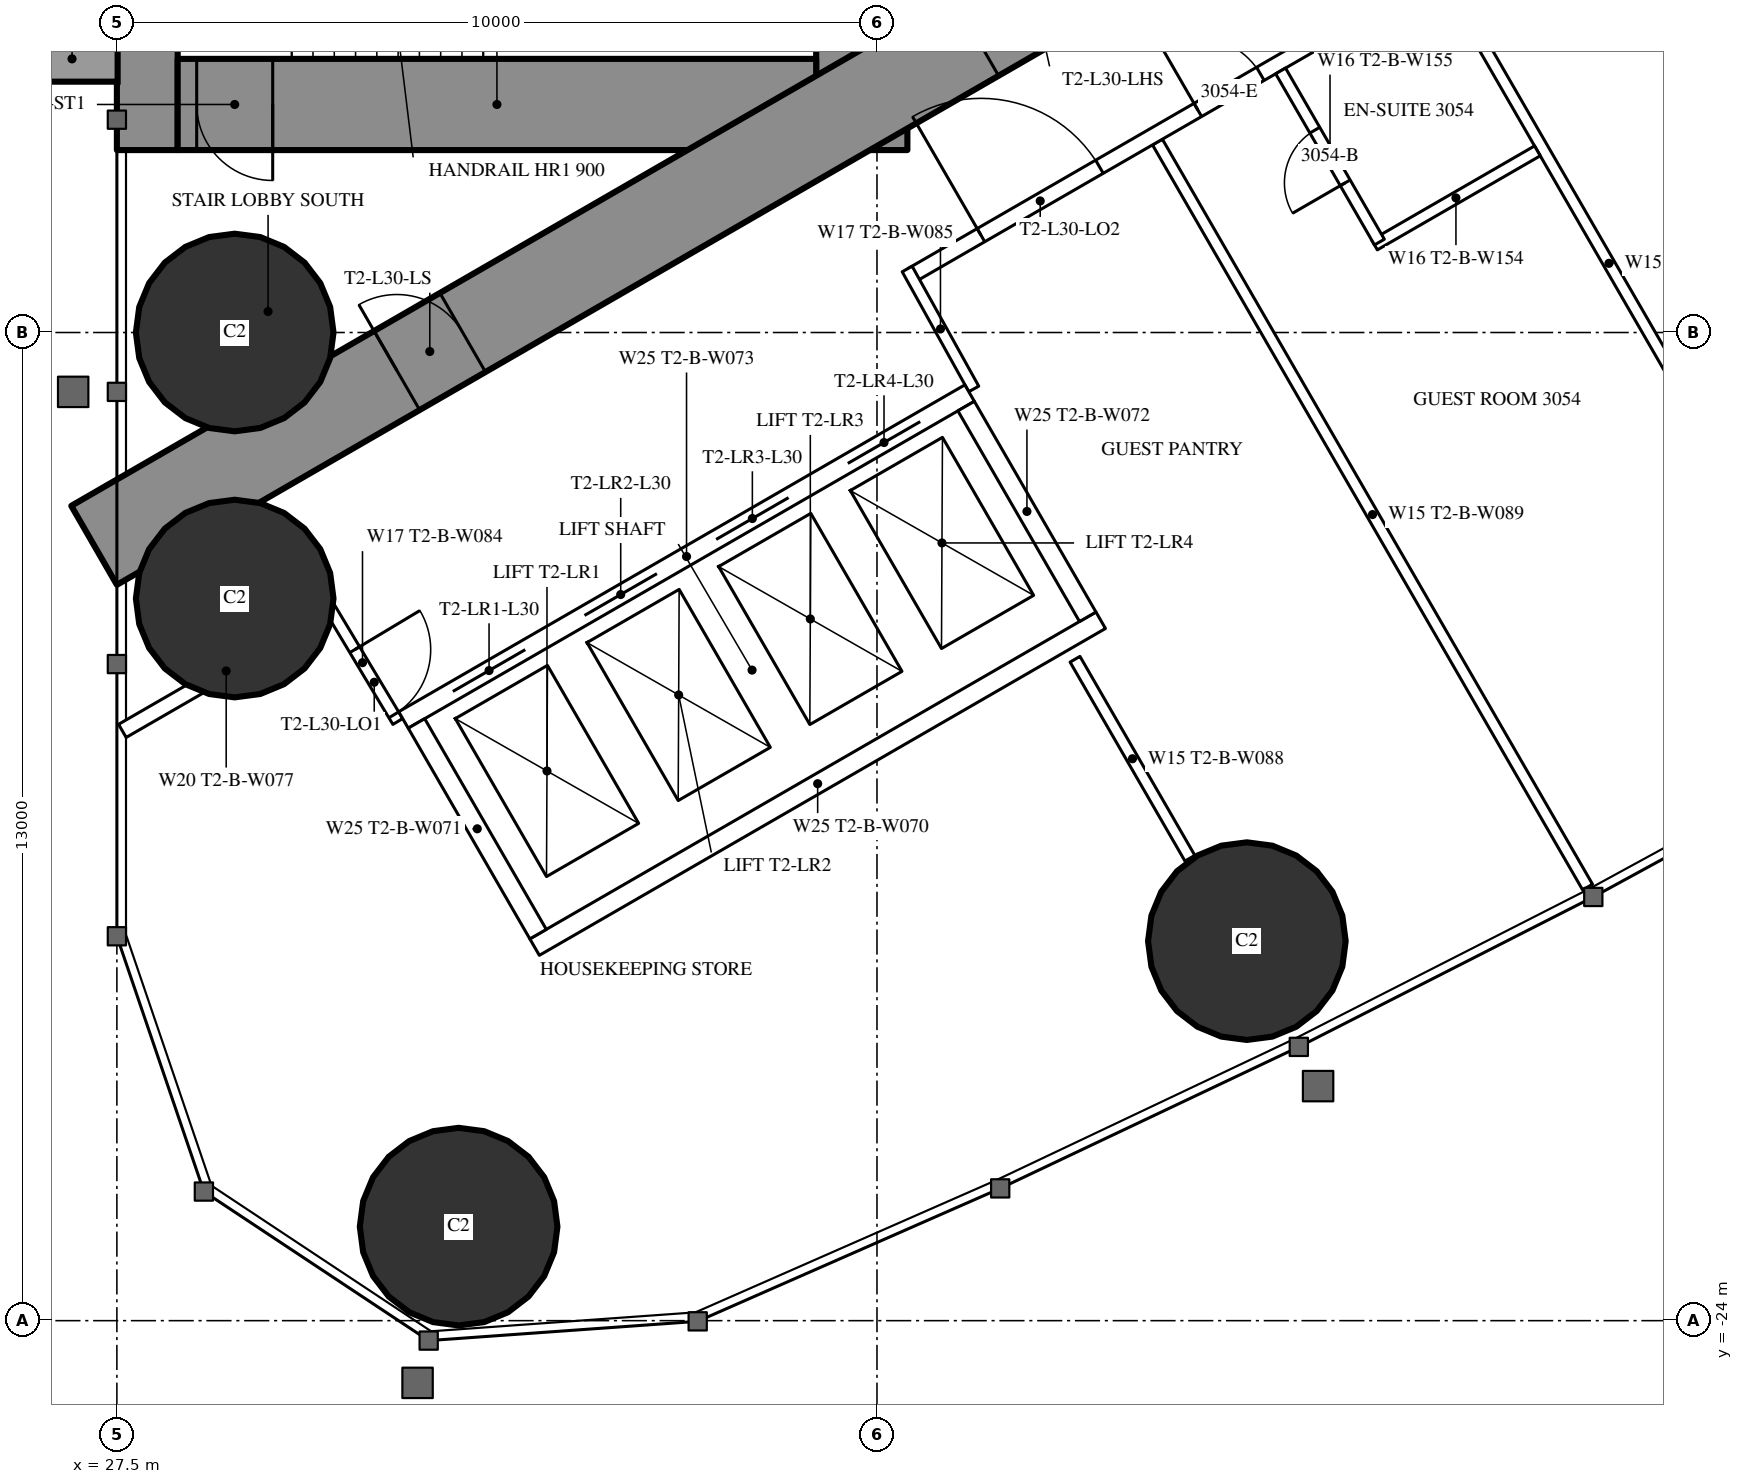
"""IFC4 building model, lengths in metres.
Left out: names, types, materials, properties, quantities, classifications, styles, units other than length and angle.
Written with IfcOpenShell. Run it as: python <this file> out.ifc"""

import sys

from ifc_helpers import new_model, si_unit, direction, frame, frame_2d, origin, origin_2d, place, context, subcontext, project, spatial, rectangle, hollow_circle, extrude, element, fill, save


model = new_model("IFC4")
c1 = context("Model", 3, precision=1e-05, world=origin(), true_north=direction((0.0, 1.0)))
c2 = subcontext(c1, "Body", "Model", "MODEL_VIEW")
j1 = project(units=[si_unit("LENGTHUNIT", "METRE"), si_unit("PLANEANGLEUNIT", "RADIAN")], contexts=[c1])
p1 = place(None, origin())
s1 = spatial("IfcSite", under=j1, at=p1, CompositionType="ELEMENT")
p2 = place(p1, origin())
s2 = spatial("IfcBuilding", under=s1, at=p2, CompositionType="ELEMENT")
p3 = place(p2, frame((0.0, 0.0, 115.1)))
s3 = spatial("IfcBuildingStorey", under=s2, at=p3, CompositionType="ELEMENT", Elevation=115.1)
for number, where, z_axis, x_axis in (
    (1, (31.996, -22.763, 0.0), (0.0, 0.0, 1.0), (1.0, 0.0, 0.0)),
    (2, (29.05, -11.0, 0.0), (0.0, 0.0, 1.0), (1.0, 0.0, 0.0)),
    (3, (29.05, -14.5, 0.0), (0.0, 0.0, 1.0), (1.0, 0.0, 0.0)),
    (4, (42.366, -19.007, 0.0), (0.0, 0.0, 1.0), (1.0, 0.0, 0.0)),
):
    element("IfcColumn", number, at=place(p3, frame(where, z_axis=z_axis, x_axis=x_axis)), inside=s3, PredefinedType="COLUMN", context=c2, shape_type="SweptSolid", body=[
        extrude(hollow_circle(Radius=1.3, WallThickness=0.1, at=origin_2d()), origin(), (0.0, 0.0, 1.0), 3.5),
    ])
p4 = place(p3, frame((27.9, -8.6, 0.0), z_axis=(0.0, 0.0, 1.0), x_axis=(0.0, 1.0, 0.0)))
e5 = element("IfcWall", 5, at=p4, inside=s3, PredefinedType="SHEAR", context=c2, shape_type="SweptSolid", body=[
    extrude(rectangle(XDim=17.2, YDim=0.8, at=frame_2d((8.6, 0.0))), origin(), (0.0, 0.0, 1.0), 3.5),
])
p5 = place(p4, frame((2.45, 0.0, 0.6)))
e6 = element("IfcOpeningElement", 6, at=p5, cuts=e5, PredefinedType="OPENING", context=c2, shape_type="SweptSolid", body=[
    extrude(rectangle(XDim=0.6, YDim=2.1, at=frame_2d((0.3, 1.05))), frame((0.0, 0.41, 0.0), z_axis=(0.0, -1.0, 0.0), x_axis=(1.0, 0.0, 0.0)), (0.0, 0.0, 1.0), 0.82),
])
p6 = place(p4, frame((14.15, 0.0, 0.6)))
e7 = element("IfcOpeningElement", 7, at=p6, cuts=e5, PredefinedType="OPENING", context=c2, shape_type="SweptSolid", body=[
    extrude(rectangle(XDim=0.6, YDim=2.1, at=frame_2d((0.3, 1.05))), frame((0.0, 0.41, 0.0), z_axis=(0.0, -1.0, 0.0), x_axis=(1.0, 0.0, 0.0)), (0.0, 0.0, 1.0), 0.82),
])
p7 = place(p3, frame((37.3, -8.6, 0.0), z_axis=(0.0, 0.0, 1.0), x_axis=(0.0, 1.0, 0.0)))
e8 = element("IfcWall", 8, at=p7, inside=s3, PredefinedType="SHEAR", context=c2, shape_type="SweptSolid", body=[
    extrude(rectangle(XDim=17.2, YDim=1.2, at=frame_2d((8.6, 0.0))), origin(), (0.0, 0.0, 1.0), 3.5),
])
p8 = place(p7, frame((7.7, 0.0, 0.0)))
e9 = element("IfcOpeningElement", 9, at=p8, cuts=e8, PredefinedType="OPENING", context=c2, shape_type="SweptSolid", body=[
    extrude(rectangle(XDim=1.8, YDim=2.2, at=frame_2d((0.9, 1.1))), frame((0.0, 0.61, 0.0), z_axis=(0.0, -1.0, 0.0), x_axis=(1.0, 0.0, 0.0)), (0.0, 0.0, 1.0), 1.22),
])
p9 = place(p3, frame((28.3, -8.0, 0.0), z_axis=(0.0, 0.0, 1.0), x_axis=(1.0, 0.0, 0.0)))
e10 = element("IfcWall", 10, at=p9, inside=s3, PredefinedType="SHEAR", context=c2, shape_type="SweptSolid", body=[
    extrude(rectangle(XDim=8.4, YDim=1.2, at=frame_2d((4.2, 0.0))), origin(), (0.0, 0.0, 1.0), 3.5),
])
p10 = place(p9, frame((0.25, 0.0, 0.0)))
e11 = element("IfcOpeningElement", 11, at=p10, cuts=e10, PredefinedType="OPENING", context=c2, shape_type="SweptSolid", body=[
    extrude(rectangle(XDim=1.0, YDim=2.2, at=frame_2d((0.5, 1.1))), frame((0.0, 0.61, 0.0), z_axis=(0.0, -1.0, 0.0), x_axis=(1.0, 0.0, 0.0)), (0.0, 0.0, 1.0), 1.22),
])
p11 = place(p3, frame((27.2, -13.8, 0.0), z_axis=(0.0, 0.0, 1.0), x_axis=(0.866027159892, 0.499996958321, 0.0)))
e12 = element("IfcWall", 12, at=p11, inside=s3, PredefinedType="SHEAR", context=c2, shape_type="SweptSolid", body=[
    extrude(rectangle(XDim=27.947, YDim=1.2, at=frame_2d((13.973, 0.0))), origin(), (0.0, 0.0, 1.0), 3.5),
])
p12 = place(p11, frame((4.6, 0.0, 0.0)))
e13 = element("IfcOpeningElement", 13, at=p12, cuts=e12, PredefinedType="OPENING", context=c2, shape_type="SweptSolid", body=[
    extrude(rectangle(XDim=1.0, YDim=2.2, at=frame_2d((0.5, 1.1))), frame((0.0, 0.61, 0.0), z_axis=(0.0, -1.0, 0.0), x_axis=(1.0, 0.0, 0.0)), (0.0, 0.0, 1.0), 1.22),
])
p13 = place(p11, frame((13.395, 0.0, 0.0)))
e14 = element("IfcOpeningElement", 14, at=p13, cuts=e12, PredefinedType="OPENING", context=c2, shape_type="SweptSolid", body=[
    extrude(rectangle(XDim=1.8, YDim=2.2, at=frame_2d((0.9, 1.1))), frame((0.0, 0.61, 0.0), z_axis=(0.0, -1.0, 0.0), x_axis=(1.0, 0.0, 0.0)), (0.0, 0.0, 1.0), 1.22),
])
p14 = place(p3, frame((41.19, -8.494, 0.0), z_axis=(0.0, 0.0, 1.0), x_axis=(0.49999258054, -0.866029687369, 0.0)))
e15 = element("IfcWall", 15, at=p14, inside=s3, PredefinedType="PARTITIONING", context=c2, shape_type="SweptSolid", body=[
    extrude(rectangle(XDim=11.318, YDim=0.15, at=frame_2d((5.659, 0.0))), origin(), (0.0, 0.0, 1.0), 3.25),
])
p15 = place(p3, frame((44.954, -6.321, 0.0), z_axis=(0.0, 0.0, 1.0), x_axis=(0.500018676722, -0.866014620505, 0.0)))
e16 = element("IfcWall", 16, at=p15, inside=s3, PredefinedType="PARTITIONING", context=c2, shape_type="SweptSolid", body=[
    extrude(rectangle(XDim=8.704, YDim=0.15, at=frame_2d((4.352, 0.0))), origin(), (0.0, 0.0, 1.0), 2.2),
])
p16 = place(p3, frame((40.105, -15.299, 0.0), z_axis=(0.0, 0.0, 1.0), x_axis=(0.499978822259, -0.866037630414, 0.0)))
e17 = element("IfcWall", 17, at=p16, inside=s3, PredefinedType="PARTITIONING", context=c2, shape_type="SweptSolid", body=[
    extrude(rectangle(XDim=3.023, YDim=0.15, at=frame_2d((1.511, 0.0))), origin(), (0.0, 0.0, 1.0), 3.25),
])
p17 = place(p3, frame((27.572, -16.241, 0.0), z_axis=(0.0, 0.0, 1.0), x_axis=(0.866029654818, 0.499992636921, 0.0)))
e18 = element("IfcWall", 18, at=p17, inside=s3, PredefinedType="PARTITIONING", context=c2, shape_type="SweptSolid", body=[
    extrude(rectangle(XDim=3.155, YDim=0.2, at=frame_2d((1.577, 0.0))), origin(), (0.0, 0.0, 1.0), 3.25),
])
p18 = place(p3, frame((37.96, -10.243, 0.0), z_axis=(0.0, 0.0, 1.0), x_axis=(0.866026429433, 0.499998223521, 0.0)))
e19 = element("IfcWall", 19, at=p18, inside=s3, PredefinedType="PARTITIONING", context=c2, shape_type="SweptSolid", body=[
    extrude(rectangle(XDim=20.487, YDim=0.2, at=frame_2d((10.243, 0.0))), origin(), (0.0, 0.0, 1.0), 3.25),
])
p19 = place(p18, frame((4.343, 0.0, 0.0)))
e20 = element("IfcOpeningElement", 20, at=p19, cuts=e19, PredefinedType="OPENING", context=c2, shape_type="SweptSolid", body=[
    extrude(rectangle(XDim=0.95, YDim=2.2, at=frame_2d((0.475, 1.1))), frame((0.0, 0.11, 0.0), z_axis=(0.0, -1.0, 0.0), x_axis=(1.0, 0.0, 0.0)), (0.0, 0.0, 1.0), 0.22),
])
p20 = place(p18, frame((15.385, 0.0, 0.0)))
e21 = element("IfcOpeningElement", 21, at=p20, cuts=e19, PredefinedType="OPENING", context=c2, shape_type="SweptSolid", body=[
    extrude(rectangle(XDim=0.95, YDim=2.2, at=frame_2d((0.475, 1.1))), frame((0.0, 0.11, 0.0), z_axis=(0.0, -1.0, 0.0), x_axis=(1.0, 0.0, 0.0)), (0.0, 0.0, 1.0), 0.22),
])
p21 = place(p18, frame((17.085, 0.0, 0.0)))
e22 = element("IfcOpeningElement", 22, at=p21, cuts=e19, PredefinedType="OPENING", context=c2, shape_type="SweptSolid", body=[
    extrude(rectangle(XDim=0.95, YDim=2.2, at=frame_2d((0.475, 1.1))), frame((0.0, 0.11, 0.0), z_axis=(0.0, -1.0, 0.0), x_axis=(1.0, 0.0, 0.0)), (0.0, 0.0, 1.0), 0.22),
])
p22 = place(p18, frame((1.048, 0.0, 0.0)))
e23 = element("IfcOpeningElement", 23, at=p22, cuts=e19, PredefinedType="OPENING", context=c2, shape_type="SweptSolid", body=[
    extrude(rectangle(XDim=1.8, YDim=2.2, at=frame_2d((0.9, 1.1))), frame((0.0, 0.11, 0.0), z_axis=(0.0, -1.0, 0.0), x_axis=(1.0, 0.0, 0.0)), (0.0, 0.0, 1.0), 0.22),
])
p23 = place(p3, frame((30.267, -14.569, 0.0), z_axis=(0.0, 0.0, 1.0), x_axis=(0.514336634837, -0.857588377991, 0.0)))
e24 = element("IfcWall", 24, at=p23, inside=s3, PredefinedType="PARTITIONING", context=c2, shape_type="SweptSolid", body=[
    extrude(rectangle(XDim=1.805, YDim=0.15, at=frame_2d((0.903, 0.0))), origin(), (0.0, 0.0, 1.0), 3.25),
])
p24 = place(p23, frame((0.703, 0.0, 0.0)))
e25 = element("IfcOpeningElement", 25, at=p24, cuts=e24, PredefinedType="OPENING", context=c2, shape_type="SweptSolid", body=[
    extrude(rectangle(XDim=1.0, YDim=2.2, at=frame_2d((0.5, 1.1))), frame((0.0, 0.085, 0.0), z_axis=(0.0, -1.0, 0.0), x_axis=(1.0, 0.0, 0.0)), (0.0, 0.0, 1.0), 0.17),
])
p25 = place(p3, frame((38.773, -11.742, 0.0), z_axis=(0.0, 0.0, 1.0), x_axis=(-0.485528096672, 0.8742210632, 0.0)))
e26 = element("IfcWall", 26, at=p25, inside=s3, PredefinedType="PARTITIONING", context=c2, shape_type="SweptSolid", body=[
    extrude(rectangle(XDim=1.805, YDim=0.15, at=frame_2d((0.903, 0.0))), origin(), (0.0, 0.0, 1.0), 3.25),
])
p26 = place(p3, frame((44.045, -9.848, 0.0), z_axis=(0.0, 0.0, 1.0), x_axis=(0.866031185235, 0.4999899861, 0.0)))
e27 = element("IfcWall", 27, at=p26, inside=s3, PredefinedType="PARTITIONING", context=c2, shape_type="SweptSolid", body=[
    extrude(rectangle(XDim=2.475, YDim=0.15, at=frame_2d((1.238, 0.0))), origin(), (0.0, 0.0, 1.0), 3.25),
])
p27 = place(p3, frame((42.81, -7.559, 0.0), z_axis=(0.0, 0.0, 1.0), x_axis=(0.499936506574, -0.866062058628, 0.0)))
e28 = element("IfcWall", 28, at=p27, inside=s3, PredefinedType="PARTITIONING", context=c2, shape_type="SweptSolid", body=[
    extrude(rectangle(XDim=2.6, YDim=0.15, at=frame_2d((1.3, 0.0))), origin(), (0.0, 0.0, 1.0), 3.25),
])
p28 = place(p27, frame((0.9, 0.0, 0.0)))
e29 = element("IfcOpeningElement", 29, at=p28, cuts=e28, PredefinedType="OPENING", context=c2, shape_type="SweptSolid", body=[
    extrude(rectangle(XDim=0.8, YDim=2.2, at=frame_2d((0.4, 1.1))), frame((0.0, 0.085, 0.0), z_axis=(0.0, -1.0, 0.0), x_axis=(1.0, 0.0, 0.0)), (0.0, 0.0, 1.0), 0.17),
])
p29 = place(p3, frame((31.271, -16.097, 0.0), z_axis=(0.0, 0.0, 1.0), x_axis=(0.86604045752, 0.499973925258, 0.0)))
e30 = element("IfcWall", 30, at=p29, inside=s3, PredefinedType="PARTITIONING", context=c2, shape_type="SweptSolid", body=[
    extrude(rectangle(XDim=8.6, YDim=0.25, at=frame_2d((4.3, 0.0))), origin(), (0.0, 0.0, 1.0), 3.25),
])
p30 = place(p29, frame((0.75, 0.0, 0.0)))
e31 = element("IfcOpeningElement", 31, at=p30, cuts=e30, PredefinedType="OPENING", context=c2, shape_type="SweptSolid", body=[
    extrude(rectangle(XDim=1.1, YDim=2.2, at=frame_2d((0.55, 1.1))), frame((0.0, 0.135, 0.0), z_axis=(0.0, -1.0, 0.0), x_axis=(1.0, 0.0, 0.0)), (0.0, 0.0, 1.0), 0.27),
])
p31 = place(p29, frame((2.75, 0.0, 0.0)))
e32 = element("IfcOpeningElement", 32, at=p31, cuts=e30, PredefinedType="OPENING", context=c2, shape_type="SweptSolid", body=[
    extrude(rectangle(XDim=1.1, YDim=2.2, at=frame_2d((0.55, 1.1))), frame((0.0, 0.135, 0.0), z_axis=(0.0, -1.0, 0.0), x_axis=(1.0, 0.0, 0.0)), (0.0, 0.0, 1.0), 0.27),
])
p32 = place(p29, frame((4.75, 0.0, 0.0)))
e33 = element("IfcOpeningElement", 33, at=p32, cuts=e30, PredefinedType="OPENING", context=c2, shape_type="SweptSolid", body=[
    extrude(rectangle(XDim=1.1, YDim=2.2, at=frame_2d((0.55, 1.1))), frame((0.0, 0.135, 0.0), z_axis=(0.0, -1.0, 0.0), x_axis=(1.0, 0.0, 0.0)), (0.0, 0.0, 1.0), 0.27),
])
p33 = place(p29, frame((6.75, 0.0, 0.0)))
e34 = element("IfcOpeningElement", 34, at=p33, cuts=e30, PredefinedType="OPENING", context=c2, shape_type="SweptSolid", body=[
    extrude(rectangle(XDim=1.1, YDim=2.2, at=frame_2d((0.55, 1.1))), frame((0.0, 0.135, 0.0), z_axis=(0.0, -1.0, 0.0), x_axis=(1.0, 0.0, 0.0)), (0.0, 0.0, 1.0), 0.27),
])
p34 = place(p3, frame((32.996, -19.086, 0.0), z_axis=(0.0, 0.0, 1.0), x_axis=(0.866028165386, 0.499995216735, 0.0)))
e35 = element("IfcWall", 35, at=p34, inside=s3, PredefinedType="PARTITIONING", context=c2, shape_type="SweptSolid", body=[
    extrude(rectangle(XDim=8.6, YDim=0.25, at=frame_2d((4.3, 0.0))), origin(), (0.0, 0.0, 1.0), 3.25),
])
for number, where, z_axis, x_axis in (
    (36, (31.441, -16.143, 0.0), (0.0, 0.0, 1.0), (0.5, -0.866, 0.0)),
    (37, (38.673, -11.968, 0.0), (0.0, 0.0, 1.0), (0.5, -0.866, 0.0)),
):
    element("IfcWall", number, at=place(p3, frame(where, z_axis=z_axis, x_axis=x_axis)), inside=s3, PredefinedType="PARTITIONING", context=c2, shape_type="SweptSolid", body=[
        extrude(rectangle(XDim=3.201, YDim=0.25, at=frame_2d((1.6, 0.0))), origin(), (0.0, 0.0, 1.0), 3.25),
    ])
p35 = place(p28, origin())
e38 = element("IfcDoor", 38, at=p35, inside=s3, OperationType="SINGLE_SWING_RIGHT", PredefinedType="DOOR", context=c2, shape_type="SweptSolid", body=[
    extrude(rectangle(XDim=0.8, YDim=2.2, at=frame_2d((0.4, 1.1))), frame((0.0, 0.025, 0.0), z_axis=(0.0, -1.0, 0.0), x_axis=(1.0, 0.0, 0.0)), (0.0, 0.0, 1.0), 0.05),
])
fill(e29, e38)
p36 = place(p19, origin())
e39 = element("IfcDoor", 39, at=p36, inside=s3, OperationType="SINGLE_SWING_LEFT", PredefinedType="DOOR", context=c2, shape_type="SweptSolid", body=[
    extrude(rectangle(XDim=0.95, YDim=2.2, at=frame_2d((0.475, 1.1))), frame((0.0, 0.025, 0.0), z_axis=(0.0, -1.0, 0.0), x_axis=(1.0, 0.0, 0.0)), (0.0, 0.0, 1.0), 0.05),
])
fill(e20, e39)
p37 = place(p24, origin())
e40 = element("IfcDoor", 40, at=p37, inside=s3, OperationType="SINGLE_SWING_LEFT", PredefinedType="DOOR", context=c2, shape_type="SweptSolid", body=[
    extrude(rectangle(XDim=1.0, YDim=2.2, at=frame_2d((0.5, 1.1))), frame((0.0, 0.025, 0.0), z_axis=(0.0, -1.0, 0.0), x_axis=(1.0, 0.0, 0.0)), (0.0, 0.0, 1.0), 0.05),
])
fill(e25, e40)
p38 = place(p22, origin())
e41 = element("IfcDoor", 41, at=p38, inside=s3, OperationType="DOUBLE_DOOR_SINGLE_SWING", PredefinedType="DOOR", context=c2, shape_type="SweptSolid", body=[
    extrude(rectangle(XDim=1.8, YDim=2.2, at=frame_2d((0.9, 1.1))), frame((0.0, 0.025, 0.0), z_axis=(0.0, -1.0, 0.0), x_axis=(1.0, 0.0, 0.0)), (0.0, 0.0, 1.0), 0.05),
])
fill(e23, e41)
p39 = place(p12, origin())
e42 = element("IfcDoor", 42, at=p39, inside=s3, OperationType="SINGLE_SWING_LEFT", PredefinedType="DOOR", context=c2, shape_type="SweptSolid", body=[
    extrude(rectangle(XDim=1.0, YDim=2.2, at=frame_2d((0.5, 1.1))), frame((0.0, 0.025, 0.0), z_axis=(0.0, -1.0, 0.0), x_axis=(1.0, 0.0, 0.0)), (0.0, 0.0, 1.0), 0.05),
])
fill(e13, e42)
p40 = place(p10, origin())
e43 = element("IfcDoor", 43, at=p40, inside=s3, OperationType="SINGLE_SWING_RIGHT", PredefinedType="DOOR", context=c2, shape_type="SweptSolid", body=[
    extrude(rectangle(XDim=1.0, YDim=2.2, at=frame_2d((0.5, 1.1))), frame((0.0, 0.025, 0.0), z_axis=(0.0, -1.0, 0.0), x_axis=(1.0, 0.0, 0.0)), (0.0, 0.0, 1.0), 0.05),
])
fill(e11, e43)
p41 = place(p30, origin())
e44 = element("IfcDoor", 44, at=p41, inside=s3, OperationType="DOUBLE_DOOR_SLIDING", PredefinedType="USERDEFINED", context=c2, shape_type="SweptSolid", body=[
    extrude(rectangle(XDim=1.1, YDim=2.2, at=frame_2d((0.55, 1.1))), frame((0.0, 0.025, 0.0), z_axis=(0.0, -1.0, 0.0), x_axis=(1.0, 0.0, 0.0)), (0.0, 0.0, 1.0), 0.05),
])
fill(e31, e44)
p42 = place(p31, origin())
e45 = element("IfcDoor", 45, at=p42, inside=s3, OperationType="DOUBLE_DOOR_SLIDING", PredefinedType="USERDEFINED", context=c2, shape_type="SweptSolid", body=[
    extrude(rectangle(XDim=1.1, YDim=2.2, at=frame_2d((0.55, 1.1))), frame((0.0, 0.025, 0.0), z_axis=(0.0, -1.0, 0.0), x_axis=(1.0, 0.0, 0.0)), (0.0, 0.0, 1.0), 0.05),
])
fill(e32, e45)
p43 = place(p32, origin())
e46 = element("IfcDoor", 46, at=p43, inside=s3, OperationType="DOUBLE_DOOR_SLIDING", PredefinedType="USERDEFINED", context=c2, shape_type="SweptSolid", body=[
    extrude(rectangle(XDim=1.1, YDim=2.2, at=frame_2d((0.55, 1.1))), frame((0.0, 0.025, 0.0), z_axis=(0.0, -1.0, 0.0), x_axis=(1.0, 0.0, 0.0)), (0.0, 0.0, 1.0), 0.05),
])
fill(e33, e46)
p44 = place(p33, origin())
e47 = element("IfcDoor", 47, at=p44, inside=s3, OperationType="DOUBLE_DOOR_SLIDING", PredefinedType="USERDEFINED", context=c2, shape_type="SweptSolid", body=[
    extrude(rectangle(XDim=1.1, YDim=2.2, at=frame_2d((0.55, 1.1))), frame((0.0, 0.025, 0.0), z_axis=(0.0, -1.0, 0.0), x_axis=(1.0, 0.0, 0.0)), (0.0, 0.0, 1.0), 0.05),
])
fill(e34, e47)
save(model, sys.argv[1])
